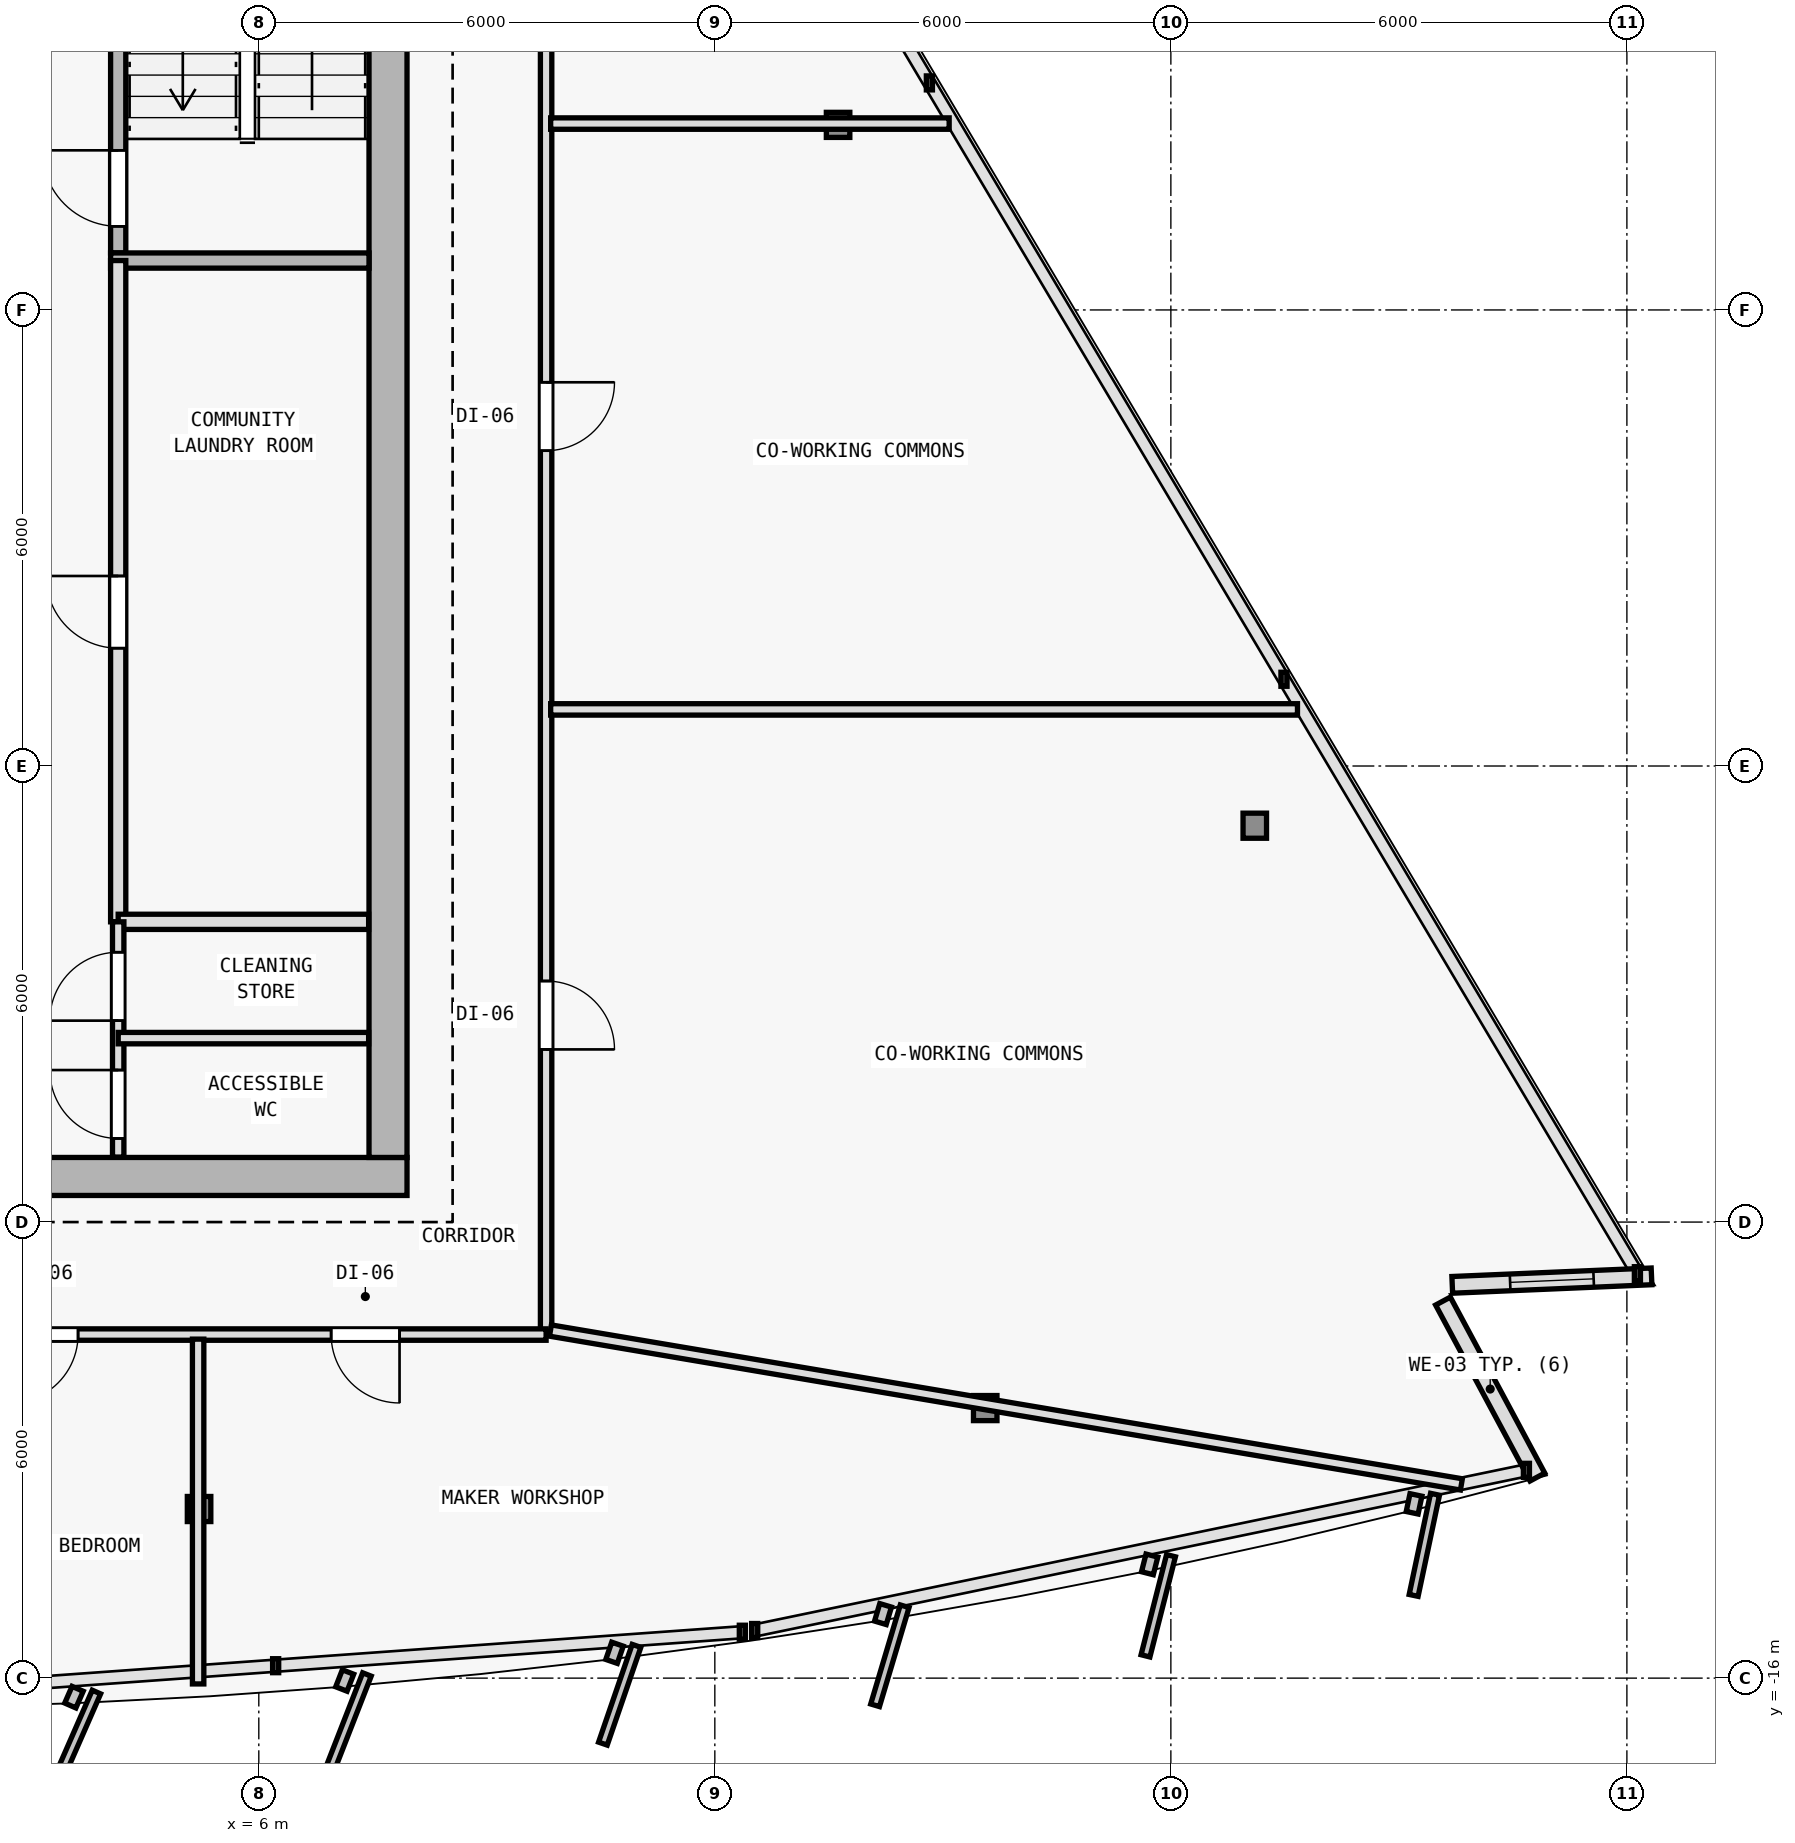
"""IFC4 building model, lengths in metres.
Left out: names, types, materials, properties, quantities, classifications, styles, units other than length and angle.
Written with IfcOpenShell. Run it as: python <this file> out.ifc"""

import sys

from ifc_helpers import new_model, si_unit, direction, frame, frame_2d, origin, origin_2d, place, context, subcontext, project, spatial, rectangle, i_section, extrude, element, fill, save


model = new_model("IFC4")
c1 = context("Model", 3, precision=1e-05, world=origin(), true_north=direction((0.0, 1.0)))
c2 = subcontext(c1, "Body", "Model", "MODEL_VIEW")
j1 = project(units=[si_unit("LENGTHUNIT", "METRE"), si_unit("PLANEANGLEUNIT", "RADIAN")], contexts=[c1])
p1 = place(None, origin())
s1 = spatial("IfcSite", under=j1, at=p1, CompositionType="ELEMENT")
p2 = place(p1, origin())
s2 = spatial("IfcBuilding", under=s1, at=p2, CompositionType="ELEMENT")
p3 = place(p2, frame((0.0, 0.0, 268.8)))
s3 = spatial("IfcBuildingStorey", under=s2, at=p3, CompositionType="ELEMENT", Elevation=268.8)
for number, where, z_axis, x_axis in (
    (1, (7.7, -9.4, 0.0), (0.0, 0.0, 1.0), (1.0, 0.0, 0.0)),
    (2, (7.7, 0.4, 0.0), (0.0, 0.0, 1.0), (1.0, 0.0, 0.0)),
):
    element("IfcColumn", number, at=place(p3, frame(where, z_axis=z_axis, x_axis=x_axis)), inside=s3, PredefinedType="COLUMN", context=c2, shape_type="SweptSolid", body=[
        extrude(i_section(OverallWidth=0.374, OverallDepth=0.372, WebThickness=0.012, FlangeThickness=0.02, FilletRadius=0.015, at=origin_2d()), origin(), (0.0, 0.0, 1.0), 3.6),
    ])
p4 = place(p3, frame((5.214, -13.775, 0.005), z_axis=(-0.00693381708, 0.03528089279, 0.999353381334), x_axis=(-0.981229659911, -0.192842823335, 0.0)))
e3 = element("IfcColumn", 3, at=p4, inside=s3, PredefinedType="COLUMN", context=c2, shape_type="SweptSolid", body=[
    extrude(i_section(OverallWidth=0.309, OverallDepth=0.33, WebThickness=0.011, FlangeThickness=0.019, FilletRadius=0.027, at=origin_2d()), origin(), (0.0, 0.0, 1.0), 3.592),
])
p5 = place(p3, frame((15.558, -12.447, 0.005), z_axis=(-0.020662881976, 0.033441243198, 0.999227065567), x_axis=(-0.850707037426, -0.525640120686, 0.0)))
e4 = element("IfcColumn", 4, at=p5, inside=s3, PredefinedType="COLUMN", context=c2, shape_type="SweptSolid", body=[
    extrude(i_section(OverallWidth=0.309, OverallDepth=0.33, WebThickness=0.011, FlangeThickness=0.019, FilletRadius=0.027, at=origin_2d()), origin(), (0.0, 0.0, 1.0), 3.592),
])
p6 = place(p3, frame((19.104, -4.785, 0.005), z_axis=(-0.026105663043, 0.021618752208, 0.999425396871), x_axis=(-0.637813971185, -0.770190455771, 0.0)))
e5 = element("IfcColumn", 5, at=p6, inside=s3, PredefinedType="COLUMN", context=c2, shape_type="SweptSolid", body=[
    extrude(i_section(OverallWidth=0.309, OverallDepth=0.33, WebThickness=0.011, FlangeThickness=0.019, FilletRadius=0.027, at=origin_2d()), origin(), (0.0, 0.0, 1.0), 3.591),
])
p7 = place(p3, frame((13.622, 4.435, 0.005), z_axis=(-0.018906028715, 0.009589028952, 0.999775281052), x_axis=(-0.452339157861, -0.891845999187, 0.0)))
e6 = element("IfcColumn", 6, at=p7, inside=s3, PredefinedType="COLUMN", context=c2, shape_type="SweptSolid", body=[
    extrude(i_section(OverallWidth=0.309, OverallDepth=0.33, WebThickness=0.011, FlangeThickness=0.019, FilletRadius=0.027, at=origin_2d()), origin(), (0.0, 0.0, 1.0), 3.59),
])
p8 = place(p3, frame((21.581, -11.04, 0.0), z_axis=(0.0, 0.0, 1.0), x_axis=(0.472791303324, -0.881174434208, 0.0)))
e7 = element("IfcWall", 7, at=p8, inside=s3, PredefinedType="SOLIDWALL", context=c2, shape_type="SweptSolid", body=[
    extrude(rectangle(XDim=2.627, YDim=0.22, at=frame_2d((1.313, 0.0))), origin(), (0.0, 0.0, 1.0), 3.35),
])
p9 = place(p3, frame((24.324, -10.714, 0.0), z_axis=(0.0, 0.0, 1.0), x_axis=(-0.999095924753, -0.042512740932, 0.0)))
e8 = element("IfcWall", 8, at=p9, inside=s3, PredefinedType="SOLIDWALL", context=c2, shape_type="SweptSolid", body=[
    extrude(rectangle(XDim=2.625, YDim=0.22, at=frame_2d((1.312, 0.0))), origin(), (0.0, 0.0, 1.0), 3.35),
])
p10 = place(p9, frame((0.762, 0.0, 0.62)))
e9 = element("IfcOpeningElement", 9, at=p10, cuts=e8, PredefinedType="OPENING", context=c2, shape_type="SweptSolid", body=[
    extrude(rectangle(XDim=1.1, YDim=1.8, at=frame_2d((0.55, 0.9))), frame((0.0, 0.12, 0.0), z_axis=(0.0, -1.0, 0.0), x_axis=(1.0, 0.0, 0.0)), (0.0, 0.0, 1.0), 0.24),
])
p11 = place(p3, frame((-7.95, -9.4, 0.0), z_axis=(0.0, 0.0, 1.0), x_axis=(1.0, 0.0, 0.0)))
e10 = element("IfcWall", 10, at=p11, inside=s3, PredefinedType="SHEAR", context=c2, shape_type="SweptSolid", body=[
    extrude(rectangle(XDim=15.9, YDim=0.5, at=frame_2d((7.95, 0.0))), origin(), (0.0, 0.0, 1.0), 3.35),
])
p12 = place(p11, frame((9.6, 0.0, 0.0)))
e11 = element("IfcOpeningElement", 11, at=p12, cuts=e10, PredefinedType="OPENING", context=c2, shape_type="SweptSolid", body=[
    extrude(rectangle(XDim=1.5, YDim=2.2, at=frame_2d((0.75, 1.1))), frame((0.0, 0.26, 0.0), z_axis=(0.0, -1.0, 0.0), x_axis=(1.0, 0.0, 0.0)), (0.0, 0.0, 1.0), 0.52),
])
p13 = place(p3, frame((7.7, 9.95, 0.0), z_axis=(0.0, 0.0, 1.0), x_axis=(0.0, -1.0, 0.0)))
e12 = element("IfcWall", 12, at=p13, inside=s3, PredefinedType="SHEAR", context=c2, shape_type="SweptSolid", body=[
    extrude(rectangle(XDim=19.1, YDim=0.5, at=frame_2d((9.55, 0.0))), origin(), (0.0, 0.0, 1.0), 3.35),
])
p14 = place(p3, frame((4.15, 2.75, 0.0), z_axis=(0.0, 0.0, 1.0), x_axis=(0.0, 1.0, 0.0)))
e13 = element("IfcWall", 13, at=p14, inside=s3, PredefinedType="SOLIDWALL", context=c2, shape_type="SweptSolid", body=[
    extrude(rectangle(XDim=7.2, YDim=0.2, at=frame_2d((3.6, 0.0))), origin(), (0.0, 0.0, 1.0), 3.35),
])
p15 = place(p14, frame((0.35, 0.0, 0.0)))
e14 = element("IfcOpeningElement", 14, at=p15, cuts=e13, PredefinedType="OPENING", context=c2, shape_type="SweptSolid", body=[
    extrude(rectangle(XDim=1.0, YDim=2.15, at=frame_2d((0.5, 1.075))), frame((0.0, 0.11, 0.0), z_axis=(0.0, -1.0, 0.0), x_axis=(1.0, 0.0, 0.0)), (0.0, 0.0, 1.0), 0.22),
])
p16 = place(p3, frame((4.05, 2.65, 0.0), z_axis=(0.0, 0.0, 1.0), x_axis=(1.0, 0.0, 0.0)))
e15 = element("IfcWall", 15, at=p16, inside=s3, PredefinedType="SOLIDWALL", context=c2, shape_type="SweptSolid", body=[
    extrude(rectangle(XDim=3.4, YDim=0.2, at=frame_2d((1.7, 0.0))), origin(), (0.0, 0.0, 1.0), 3.35),
])
p17 = place(p3, frame((4.15, -6.05, 0.0), z_axis=(0.0, 0.0, 1.0), x_axis=(0.0, 1.0, 0.0)))
e16 = element("IfcWall", 16, at=p17, inside=s3, PredefinedType="SOLIDWALL", context=c2, shape_type="SweptSolid", body=[
    extrude(rectangle(XDim=8.7, YDim=0.2, at=frame_2d((4.35, 0.0))), origin(), (0.0, 0.0, 1.0), 3.35),
])
p18 = place(p17, frame((3.6, 0.0, 0.0)))
e17 = element("IfcOpeningElement", 17, at=p18, cuts=e16, PredefinedType="OPENING", context=c2, shape_type="SweptSolid", body=[
    extrude(rectangle(XDim=0.95, YDim=2.1, at=frame_2d((0.475, 1.05))), frame((0.0, 0.11, 0.0), z_axis=(0.0, -1.0, 0.0), x_axis=(1.0, 0.0, 0.0)), (0.0, 0.0, 1.0), 0.22),
])
p19 = place(p3, frame((4.15, -6.05, 0.0), z_axis=(0.0, 0.0, 1.0), x_axis=(1.0, 0.0, 0.0)))
e18 = element("IfcWall", 18, at=p19, inside=s3, PredefinedType="SOLIDWALL", context=c2, shape_type="SweptSolid", body=[
    extrude(rectangle(XDim=3.295, YDim=0.2, at=frame_2d((1.647, 0.0))), origin(), (0.0, 0.0, 1.0), 3.35),
])
p20 = place(p3, frame((4.15, -9.145, 0.0), z_axis=(0.0, 0.0, 1.0), x_axis=(0.0, 1.0, 0.0)))
e19 = element("IfcWall", 19, at=p20, inside=s3, PredefinedType="PARTITIONING", context=c2, shape_type="SweptSolid", body=[
    extrude(rectangle(XDim=3.095, YDim=0.15, at=frame_2d((1.547, 0.0))), origin(), (0.0, 0.0, 1.0), 3.35),
])
p21 = place(p20, frame((0.245, 0.0, 0.0)))
e20 = element("IfcOpeningElement", 20, at=p21, cuts=e19, PredefinedType="OPENING", context=c2, shape_type="SweptSolid", body=[
    extrude(rectangle(XDim=0.9, YDim=2.1, at=frame_2d((0.45, 1.05))), frame((0.0, 0.085, 0.0), z_axis=(0.0, -1.0, 0.0), x_axis=(1.0, 0.0, 0.0)), (0.0, 0.0, 1.0), 0.17),
])
p22 = place(p20, frame((1.795, 0.0, 0.0)))
e21 = element("IfcOpeningElement", 21, at=p22, cuts=e19, PredefinedType="OPENING", context=c2, shape_type="SweptSolid", body=[
    extrude(rectangle(XDim=0.9, YDim=2.1, at=frame_2d((0.45, 1.05))), frame((0.0, 0.085, 0.0), z_axis=(0.0, -1.0, 0.0), x_axis=(1.0, 0.0, 0.0)), (0.0, 0.0, 1.0), 0.17),
])
p23 = place(p3, frame((4.15, -7.58, 0.0), z_axis=(0.0, 0.0, 1.0), x_axis=(1.0, 0.0, 0.0)))
e22 = element("IfcWall", 22, at=p23, inside=s3, PredefinedType="PARTITIONING", context=c2, shape_type="SweptSolid", body=[
    extrude(rectangle(XDim=3.295, YDim=0.15, at=frame_2d((1.647, 0.0))), origin(), (0.0, 0.0, 1.0), 3.35),
])
p24 = place(p3, frame((9.78, 8.226, 0.0), z_axis=(0.0, 0.0, 1.0), x_axis=(0.0, -1.0, 0.0)))
e23 = element("IfcWall", 23, at=p24, inside=s3, PredefinedType="PARTITIONING", context=c2, shape_type="SweptSolid", body=[
    extrude(rectangle(XDim=19.706, YDim=0.15, at=frame_2d((9.853, 0.0))), origin(), (0.0, 0.0, 1.0), 2.875),
])
p25 = place(p24, frame((15.054, 0.0, 0.0)))
e24 = element("IfcOpeningElement", 24, at=p25, cuts=e23, PredefinedType="OPENING", context=c2, shape_type="SweptSolid", body=[
    extrude(rectangle(XDim=0.9, YDim=2.1, at=frame_2d((0.45, 1.05))), frame((0.0, 0.085, 0.0), z_axis=(0.0, -1.0, 0.0), x_axis=(1.0, 0.0, 0.0)), (0.0, 0.0, 1.0), 0.17),
])
p26 = place(p24, frame((7.177, 0.0, 0.0)))
e25 = element("IfcOpeningElement", 25, at=p26, cuts=e23, PredefinedType="OPENING", context=c2, shape_type="SweptSolid", body=[
    extrude(rectangle(XDim=0.9, YDim=2.1, at=frame_2d((0.45, 1.05))), frame((0.0, 0.085, 0.0), z_axis=(0.0, -1.0, 0.0), x_axis=(1.0, 0.0, 0.0)), (0.0, 0.0, 1.0), 0.17),
])
p27 = place(p3, frame((9.78, -11.48, 0.0), z_axis=(0.0, 0.0, 1.0), x_axis=(-1.0, 0.0, 0.0)))
e26 = element("IfcWall", 26, at=p27, inside=s3, PredefinedType="PARTITIONING", context=c2, shape_type="SweptSolid", body=[
    extrude(rectangle(XDim=19.56, YDim=0.15, at=frame_2d((9.78, 0.0))), origin(), (0.0, 0.0, 1.0), 2.725),
])
p28 = place(p27, frame((16.732, 0.0, 0.0)))
e27 = element("IfcOpeningElement", 27, at=p28, cuts=e26, PredefinedType="OPENING", context=c2, shape_type="SweptSolid", body=[
    extrude(rectangle(XDim=0.9, YDim=2.1, at=frame_2d((0.45, 1.05))), frame((0.0, 0.085, 0.0), z_axis=(0.0, -1.0, 0.0), x_axis=(1.0, 0.0, 0.0)), (0.0, 0.0, 1.0), 0.17),
])
p29 = place(p27, frame((12.946, 0.0, 0.0)))
e28 = element("IfcOpeningElement", 28, at=p29, cuts=e26, PredefinedType="OPENING", context=c2, shape_type="SweptSolid", body=[
    extrude(rectangle(XDim=0.9, YDim=2.1, at=frame_2d((0.45, 1.05))), frame((0.0, 0.085, 0.0), z_axis=(0.0, -1.0, 0.0), x_axis=(1.0, 0.0, 0.0)), (0.0, 0.0, 1.0), 0.17),
])
p30 = place(p27, frame((9.774, 0.0, 0.0)))
e29 = element("IfcOpeningElement", 29, at=p30, cuts=e26, PredefinedType="OPENING", context=c2, shape_type="SweptSolid", body=[
    extrude(rectangle(XDim=0.9, YDim=2.1, at=frame_2d((0.45, 1.05))), frame((0.0, 0.085, 0.0), z_axis=(0.0, -1.0, 0.0), x_axis=(1.0, 0.0, 0.0)), (0.0, 0.0, 1.0), 0.17),
])
p31 = place(p27, frame((6.158, 0.0, 0.0)))
e30 = element("IfcOpeningElement", 30, at=p31, cuts=e26, PredefinedType="OPENING", context=c2, shape_type="SweptSolid", body=[
    extrude(rectangle(XDim=0.9, YDim=2.1, at=frame_2d((0.45, 1.05))), frame((0.0, 0.085, 0.0), z_axis=(0.0, -1.0, 0.0), x_axis=(1.0, 0.0, 0.0)), (0.0, 0.0, 1.0), 0.17),
])
p32 = place(p27, frame((1.928, 0.0, 0.0)))
e31 = element("IfcOpeningElement", 31, at=p32, cuts=e26, PredefinedType="OPENING", context=c2, shape_type="SweptSolid", body=[
    extrude(rectangle(XDim=0.9, YDim=2.1, at=frame_2d((0.45, 1.05))), frame((0.0, 0.085, 0.0), z_axis=(0.0, -1.0, 0.0), x_axis=(1.0, 0.0, 0.0)), (0.0, 0.0, 1.0), 0.17),
])
p33 = place(p3, frame((5.202, -11.54, 0.0), z_axis=(0.0, 0.0, 1.0), x_axis=(0.0, -1.0, 0.0)))
e32 = element("IfcWall", 32, at=p33, inside=s3, PredefinedType="PARTITIONING", context=c2, shape_type="SweptSolid", body=[
    extrude(rectangle(XDim=4.536, YDim=0.15, at=frame_2d((2.268, 0.0))), origin(), (0.0, 0.0, 1.0), 2.875),
])
p34 = place(p3, frame((9.837, -11.427, 0.0), z_axis=(0.0, 0.0, 1.0), x_axis=(0.986039897187, -0.166509222433, 0.0)))
e33 = element("IfcWall", 33, at=p34, inside=s3, PredefinedType="PARTITIONING", context=c2, shape_type="SweptSolid", body=[
    extrude(rectangle(XDim=12.155, YDim=0.15, at=frame_2d((6.078, 0.0))), origin(), (0.0, 0.0, 1.0), 2.875),
])
p35 = place(p3, frame((9.84, 4.452, 0.0), z_axis=(0.0, 0.0, 1.0), x_axis=(1.0, 0.0, 0.0)))
e34 = element("IfcWall", 34, at=p35, inside=s3, PredefinedType="PARTITIONING", context=c2, shape_type="SweptSolid", body=[
    extrude(rectangle(XDim=5.243, YDim=0.15, at=frame_2d((2.622, 0.0))), origin(), (0.0, 0.0, 1.0), 2.995),
])
p36 = place(p3, frame((9.84, -3.255, 0.0), z_axis=(0.0, 0.0, 1.0), x_axis=(1.0, 0.0, 0.0)))
e35 = element("IfcWall", 35, at=p36, inside=s3, PredefinedType="PARTITIONING", context=c2, shape_type="SweptSolid", body=[
    extrude(rectangle(XDim=9.826, YDim=0.15, at=frame_2d((4.913, 0.0))), origin(), (0.0, 0.0, 1.0), 2.965),
])
p37 = place(p10, origin())
e36 = element("IfcWindow", 36, at=p37, inside=s3, PartitioningType="SINGLE_PANEL", PredefinedType="WINDOW", context=c2, shape_type="SweptSolid", body=[
    extrude(rectangle(XDim=1.1, YDim=1.8, at=frame_2d((0.55, 0.9))), frame((0.0, 0.03, 0.0), z_axis=(0.0, -1.0, 0.0), x_axis=(1.0, 0.0, 0.0)), (0.0, 0.0, 1.0), 0.06),
])
fill(e9, e36)
p38 = place(p15, origin())
e37 = element("IfcDoor", 37, at=p38, inside=s3, OperationType="SINGLE_SWING_RIGHT", PredefinedType="DOOR", context=c2, shape_type="SweptSolid", body=[
    extrude(rectangle(XDim=1.0, YDim=2.15, at=frame_2d((0.5, 1.075))), frame((0.0, 0.025, 0.0), z_axis=(0.0, -1.0, 0.0), x_axis=(1.0, 0.0, 0.0)), (0.0, 0.0, 1.0), 0.05),
])
fill(e14, e37)
p39 = place(p18, origin())
e38 = element("IfcDoor", 38, at=p39, inside=s3, OperationType="SINGLE_SWING_RIGHT", PredefinedType="DOOR", context=c2, shape_type="SweptSolid", body=[
    extrude(rectangle(XDim=0.95, YDim=2.1, at=frame_2d((0.475, 1.05))), frame((0.0, 0.025, 0.0), z_axis=(0.0, -1.0, 0.0), x_axis=(1.0, 0.0, 0.0)), (0.0, 0.0, 1.0), 0.05),
])
fill(e17, e38)
p40 = place(p21, origin())
e39 = element("IfcDoor", 39, at=p40, inside=s3, OperationType="SINGLE_SWING_RIGHT", PredefinedType="DOOR", context=c2, shape_type="SweptSolid", body=[
    extrude(rectangle(XDim=0.9, YDim=2.1, at=frame_2d((0.45, 1.05))), frame((0.0, 0.025, 0.0), z_axis=(0.0, -1.0, 0.0), x_axis=(1.0, 0.0, 0.0)), (0.0, 0.0, 1.0), 0.05),
])
fill(e20, e39)
p41 = place(p22, origin())
e40 = element("IfcDoor", 40, at=p41, inside=s3, OperationType="SINGLE_SWING_LEFT", PredefinedType="DOOR", context=c2, shape_type="SweptSolid", body=[
    extrude(rectangle(XDim=0.9, YDim=2.1, at=frame_2d((0.45, 1.05))), frame((0.0, 0.025, 0.0), z_axis=(0.0, -1.0, 0.0), x_axis=(1.0, 0.0, 0.0)), (0.0, 0.0, 1.0), 0.05),
])
fill(e21, e40)
p42 = place(p31, origin())
e41 = element("IfcDoor", 41, at=p42, inside=s3, OperationType="SINGLE_SWING_RIGHT", PredefinedType="DOOR", context=c2, shape_type="SweptSolid", body=[
    extrude(rectangle(XDim=0.9, YDim=2.1, at=frame_2d((0.45, 1.05))), frame((0.0, 0.025, 0.0), z_axis=(0.0, -1.0, 0.0), x_axis=(1.0, 0.0, 0.0)), (0.0, 0.0, 1.0), 0.05),
])
fill(e30, e41)
p43 = place(p32, origin())
e42 = element("IfcDoor", 42, at=p43, inside=s3, OperationType="SINGLE_SWING_LEFT", PredefinedType="DOOR", context=c2, shape_type="SweptSolid", body=[
    extrude(rectangle(XDim=0.9, YDim=2.1, at=frame_2d((0.45, 1.05))), frame((0.0, 0.025, 0.0), z_axis=(0.0, -1.0, 0.0), x_axis=(1.0, 0.0, 0.0)), (0.0, 0.0, 1.0), 0.05),
])
fill(e31, e42)
p44 = place(p25, origin())
e43 = element("IfcDoor", 43, at=p44, inside=s3, OperationType="SINGLE_SWING_RIGHT", PredefinedType="DOOR", context=c2, shape_type="SweptSolid", body=[
    extrude(rectangle(XDim=0.9, YDim=2.1, at=frame_2d((0.45, 1.05))), frame((0.0, 0.025, 0.0), z_axis=(0.0, -1.0, 0.0), x_axis=(1.0, 0.0, 0.0)), (0.0, 0.0, 1.0), 0.05),
])
fill(e24, e43)
p45 = place(p26, origin())
e44 = element("IfcDoor", 44, at=p45, inside=s3, OperationType="SINGLE_SWING_LEFT", PredefinedType="DOOR", context=c2, shape_type="SweptSolid", body=[
    extrude(rectangle(XDim=0.9, YDim=2.1, at=frame_2d((0.45, 1.05))), frame((0.0, 0.025, 0.0), z_axis=(0.0, -1.0, 0.0), x_axis=(1.0, 0.0, 0.0)), (0.0, 0.0, 1.0), 0.05),
])
fill(e25, e44)
save(model, sys.argv[1])
